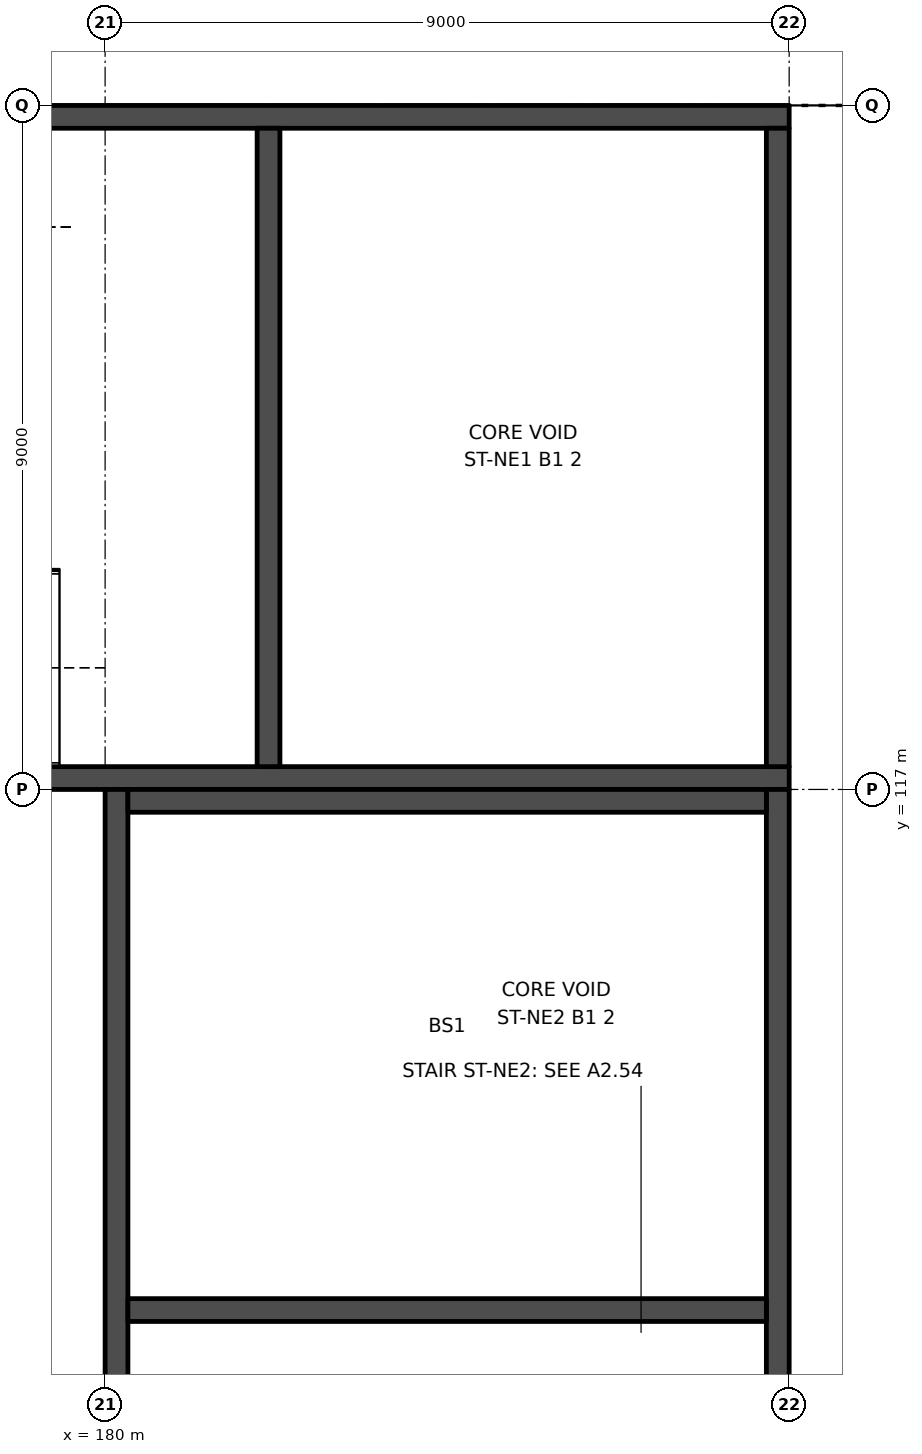
"""IFC4 building model, lengths in metres.
Left out: names, types, materials, properties, quantities, classifications, styles, units other than length and angle.
Written with IfcOpenShell. Run it as: python <this file> out.ifc"""

import sys

from ifc_helpers import new_model, si_unit, direction, frame, frame_2d, origin, place, context, subcontext, project, spatial, rectangle, extrude, element, save


model = new_model("IFC4")
c1 = context("Model", 3, precision=1e-05, world=origin(), true_north=direction((0.0, 1.0)))
c2 = subcontext(c1, "Body", "Model", "MODEL_VIEW")
j1 = project(units=[si_unit("LENGTHUNIT", "METRE"), si_unit("PLANEANGLEUNIT", "RADIAN")], contexts=[c1])
p1 = place(None, origin())
s1 = spatial("IfcSite", under=j1, at=p1, CompositionType="ELEMENT")
p2 = place(p1, origin())
s2 = spatial("IfcBuilding", under=s1, at=p2, CompositionType="ELEMENT")
p3 = place(p2, frame((0.0, 0.0, -6.0)))
s3 = spatial("IfcBuildingStorey", under=s2, at=p3, CompositionType="ELEMENT", Elevation=-6.0)
p4 = place(p3, frame((170.75, 117.15, 0.0), z_axis=(0.0, 0.0, 1.0), x_axis=(1.0, 0.0, 0.0)))
e1 = element("IfcWall", 1, at=p4, inside=s3, PredefinedType="SHEAR", context=c2, shape_type="SweptSolid", body=[
    extrude(rectangle(XDim=18.25, YDim=0.3, at=frame_2d((9.125, 0.0))), origin(), (0.0, 0.0, 1.0), 6.0),
])
p5 = place(p4, frame((1.75, 0.0, 0.0)))
e2 = element("IfcOpeningElement", 2, at=p5, cuts=e1, PredefinedType="OPENING", context=c2, shape_type="SweptSolid", body=[
    extrude(rectangle(XDim=1.2, YDim=2.1, at=frame_2d((0.6, 1.05))), frame((0.0, 0.16, 0.0), z_axis=(0.0, -1.0, 0.0), x_axis=(1.0, 0.0, 0.0)), (0.0, 0.0, 1.0), 0.32),
])
p6 = place(p3, frame((171.0, 125.85, 0.0), z_axis=(0.0, 0.0, 1.0), x_axis=(1.0, 0.0, 0.0)))
e3 = element("IfcWall", 3, at=p6, inside=s3, PredefinedType="SHEAR", context=c2, shape_type="SweptSolid", body=[
    extrude(rectangle(XDim=18.0, YDim=0.3, at=frame_2d((9.0, 0.0))), origin(), (0.0, 0.0, 1.0), 6.0),
])
for number, where, z_axis, x_axis in (
    (4, (188.85, 117.3, 0.0), (0.0, 0.0, 1.0), (0.0, 1.0, 0.0)),
    (5, (182.15, 117.3, 0.0), (0.0, 0.0, 1.0), (0.0, 1.0, 0.0)),
):
    element("IfcWall", number, at=place(p3, frame(where, z_axis=z_axis, x_axis=x_axis)), inside=s3, PredefinedType="SHEAR", context=c2, shape_type="SweptSolid", body=[
        extrude(rectangle(XDim=8.4, YDim=0.3, at=frame_2d((4.2, 0.0))), origin(), (0.0, 0.0, 1.0), 6.0),
    ])
p7 = place(p3, frame((180.15, 99.0, 0.0), z_axis=(0.0, 0.0, 1.0), x_axis=(0.0, 1.0, 0.0)))
e6 = element("IfcWall", 6, at=p7, inside=s3, PredefinedType="SHEAR", context=c2, shape_type="SweptSolid", body=[
    extrude(rectangle(XDim=18.0, YDim=0.3, at=frame_2d((9.0, 0.0))), origin(), (0.0, 0.0, 1.0), 6.0),
])
p8 = place(p7, frame((1.5, 0.0, 0.0)))
e7 = element("IfcOpeningElement", 7, at=p8, cuts=e6, PredefinedType="OPENING", context=c2, shape_type="SweptSolid", body=[
    extrude(rectangle(XDim=1.2, YDim=2.1, at=frame_2d((0.6, 1.05))), frame((0.0, 0.16, 0.0), z_axis=(0.0, -1.0, 0.0), x_axis=(1.0, 0.0, 0.0)), (0.0, 0.0, 1.0), 0.32),
])
p9 = place(p3, frame((188.85, 99.0, 0.0), z_axis=(0.0, 0.0, 1.0), x_axis=(0.0, 1.0, 0.0)))
e8 = element("IfcWall", 8, at=p9, inside=s3, PredefinedType="SHEAR", context=c2, shape_type="SweptSolid", body=[
    extrude(rectangle(XDim=18.0, YDim=0.3, at=frame_2d((9.0, 0.0))), origin(), (0.0, 0.0, 1.0), 6.0),
])
for number, where, z_axis, x_axis in (
    (9, (180.3, 116.85, 0.0), (0.0, 0.0, 1.0), (1.0, 0.0, 0.0)),
    (10, (180.3, 110.15, 0.0), (0.0, 0.0, 1.0), (1.0, 0.0, 0.0)),
):
    element("IfcWall", number, at=place(p3, frame(where, z_axis=z_axis, x_axis=x_axis)), inside=s3, PredefinedType="SHEAR", context=c2, shape_type="SweptSolid", body=[
        extrude(rectangle(XDim=8.4, YDim=0.3, at=frame_2d((4.2, 0.0))), origin(), (0.0, 0.0, 1.0), 6.0),
    ])
save(model, sys.argv[1])
